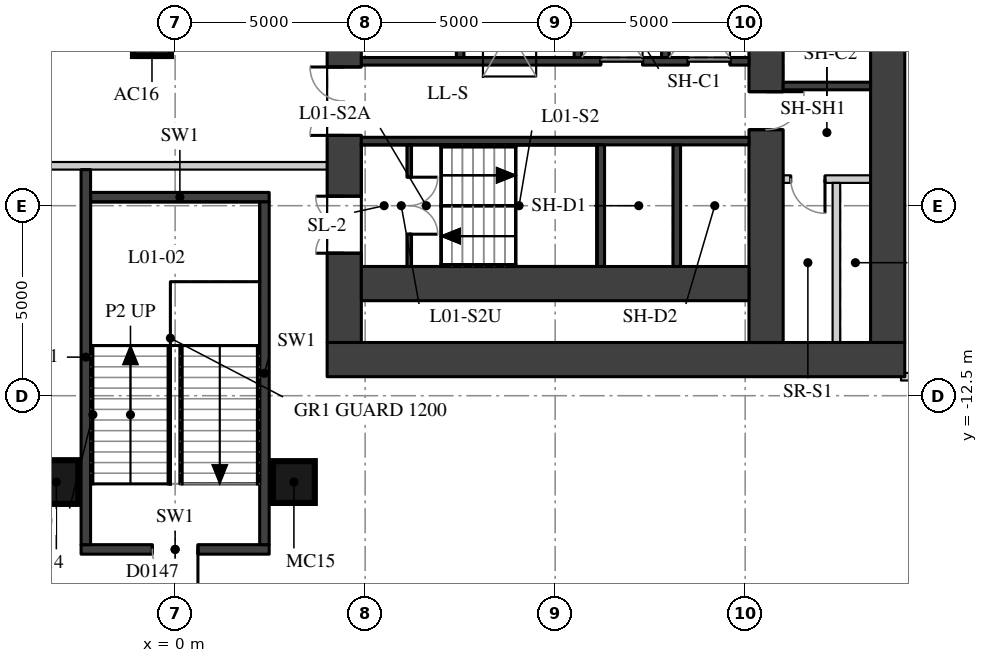
"""IFC4 building model, lengths in metres.
Left out: names, types, materials, properties, quantities, classifications, styles, units other than length and angle.
Written with IfcOpenShell. Run it as: python <this file> out.ifc"""

import sys

from ifc_helpers import new_model, si_unit, direction, frame, frame_2d, origin, origin_2d, place, context, subcontext, project, spatial, rectangle, extrude, element, fill, save


model = new_model("IFC4")
c1 = context("Model", 3, precision=1e-05, world=origin(), true_north=direction((0.0, 1.0)))
c2 = subcontext(c1, "Body", "Model", "MODEL_VIEW")
j1 = project(units=[si_unit("LENGTHUNIT", "METRE"), si_unit("PLANEANGLEUNIT", "RADIAN")], contexts=[c1])
p1 = place(None, origin())
s1 = spatial("IfcSite", under=j1, at=p1, CompositionType="ELEMENT")
p2 = place(p1, origin())
s2 = spatial("IfcBuilding", under=s1, at=p2, CompositionType="ELEMENT")
p3 = place(p2, frame((0.0, 0.0, 7.5)))
s3 = spatial("IfcBuildingStorey", under=s2, at=p3, CompositionType="ELEMENT", Elevation=7.5)
p4 = place(p3, frame((-0.609, -3.062, 0.0), z_axis=(0.0, 0.0, 1.0), x_axis=(1.0, 0.0, 0.0)))
e1 = element("IfcColumn", 1, at=p4, inside=s3, PredefinedType="COLUMN", context=c2, shape_type="SweptSolid", body=[
    extrude(rectangle(XDim=1.0, YDim=1.0, at=origin_2d()), origin(), (0.0, 0.0, 1.0), 5.0),
])
p5 = place(p3, frame((-3.126, -14.772, 0.0), z_axis=(0.0, 0.0, 1.0), x_axis=(1.0, 0.0, 0.0)))
e2 = element("IfcColumn", 2, at=p5, inside=s3, PredefinedType="COLUMN", context=c2, shape_type="SweptSolid", body=[
    extrude(rectangle(XDim=1.15, YDim=1.15, at=origin_2d()), origin(), (0.0, 0.0, 1.0), 5.0),
])
p6 = place(p3, frame((3.126, -14.772, 0.0), z_axis=(0.0, 0.0, 1.0), x_axis=(1.0, 0.0, 0.0)))
e3 = element("IfcColumn", 3, at=p6, inside=s3, PredefinedType="COLUMN", context=c2, shape_type="SweptSolid", body=[
    extrude(rectangle(XDim=1.1, YDim=1.1, at=origin_2d()), origin(), (0.0, 0.0, 1.0), 5.0),
])
p7 = place(p3, frame((4.45, -11.1, 0.0), z_axis=(0.0, 0.0, 1.0), x_axis=(0.0, 1.0, 0.0)))
e4 = element("IfcWall", 4, at=p7, inside=s3, PredefinedType="SHEAR", context=c2, shape_type="SweptSolid", body=[
    extrude(rectangle(XDim=22.2, YDim=0.9, at=frame_2d((11.1, 0.0))), origin(), (0.0, 0.0, 1.0), 4.59),
])
p8 = place(p7, frame((2.35, 0.0, 0.0)))
e5 = element("IfcOpeningElement", 5, at=p8, cuts=e4, PredefinedType="OPENING", context=c2, shape_type="SweptSolid", body=[
    extrude(rectangle(XDim=1.5, YDim=2.1, at=frame_2d((0.75, 1.05))), frame((0.0, 0.46, 0.0), z_axis=(0.0, -1.0, 0.0), x_axis=(1.0, 0.0, 0.0)), (0.0, 0.0, 1.0), 0.92),
])
p9 = place(p7, frame((5.45, 0.0, 0.0)))
e6 = element("IfcOpeningElement", 6, at=p9, cuts=e4, PredefinedType="OPENING", context=c2, shape_type="SweptSolid", body=[
    extrude(rectangle(XDim=1.8, YDim=2.1, at=frame_2d((0.9, 1.05))), frame((0.0, 0.46, 0.0), z_axis=(0.0, -1.0, 0.0), x_axis=(1.0, 0.0, 0.0)), (0.0, 0.0, 1.0), 0.92),
])
p10 = place(p7, frame((7.95, 0.0, 0.0)))
e7 = element("IfcOpeningElement", 7, at=p10, cuts=e4, PredefinedType="OPENING", context=c2, shape_type="SweptSolid", body=[
    extrude(rectangle(XDim=1.1, YDim=2.1, at=frame_2d((0.55, 1.05))), frame((0.0, 0.46, 0.0), z_axis=(0.0, -1.0, 0.0), x_axis=(1.0, 0.0, 0.0)), (0.0, 0.0, 1.0), 0.92),
])
p11 = place(p7, frame((10.6, 0.0, 0.0)))
e8 = element("IfcOpeningElement", 8, at=p11, cuts=e4, PredefinedType="OPENING", context=c2, shape_type="SweptSolid", body=[
    extrude(rectangle(XDim=1.0, YDim=2.1, at=frame_2d((0.5, 1.05))), frame((0.0, 0.46, 0.0), z_axis=(0.0, -1.0, 0.0), x_axis=(1.0, 0.0, 0.0)), (0.0, 0.0, 1.0), 0.92),
])
p12 = place(p7, frame((13.15, 0.0, 0.0)))
e9 = element("IfcOpeningElement", 9, at=p12, cuts=e4, PredefinedType="OPENING", context=c2, shape_type="SweptSolid", body=[
    extrude(rectangle(XDim=1.1, YDim=2.1, at=frame_2d((0.55, 1.05))), frame((0.0, 0.46, 0.0), z_axis=(0.0, -1.0, 0.0), x_axis=(1.0, 0.0, 0.0)), (0.0, 0.0, 1.0), 0.92),
])
p13 = place(p7, frame((14.95, 0.0, 0.0)))
e10 = element("IfcOpeningElement", 10, at=p13, cuts=e4, PredefinedType="OPENING", context=c2, shape_type="SweptSolid", body=[
    extrude(rectangle(XDim=1.8, YDim=2.1, at=frame_2d((0.9, 1.05))), frame((0.0, 0.46, 0.0), z_axis=(0.0, -1.0, 0.0), x_axis=(1.0, 0.0, 0.0)), (0.0, 0.0, 1.0), 0.92),
])
p14 = place(p7, frame((18.35, 0.0, 0.0)))
e11 = element("IfcOpeningElement", 11, at=p14, cuts=e4, PredefinedType="OPENING", context=c2, shape_type="SweptSolid", body=[
    extrude(rectangle(XDim=1.5, YDim=2.1, at=frame_2d((0.75, 1.05))), frame((0.0, 0.46, 0.0), z_axis=(0.0, -1.0, 0.0), x_axis=(1.0, 0.0, 0.0)), (0.0, 0.0, 1.0), 0.92),
])
p15 = place(p3, frame((18.75, -11.1, 0.0), z_axis=(0.0, 0.0, 1.0), x_axis=(0.0, 1.0, 0.0)))
e12 = element("IfcWall", 12, at=p15, inside=s3, PredefinedType="SHEAR", context=c2, shape_type="SweptSolid", body=[
    extrude(rectangle(XDim=22.2, YDim=0.9, at=frame_2d((11.1, 0.0))), origin(), (0.0, 0.0, 1.0), 4.59),
])
p16 = place(p3, frame((4.0, -11.55, 0.0), z_axis=(0.0, 0.0, 1.0), x_axis=(1.0, 0.0, 0.0)))
e13 = element("IfcWall", 13, at=p16, inside=s3, PredefinedType="SHEAR", context=c2, shape_type="SweptSolid", body=[
    extrude(rectangle(XDim=15.2, YDim=0.9, at=frame_2d((7.6, 0.0))), origin(), (0.0, 0.0, 1.0), 4.59),
])
p17 = place(p3, frame((15.55, -11.1, 0.0), z_axis=(0.0, 0.0, 1.0), x_axis=(0.0, 1.0, 0.0)))
e14 = element("IfcWall", 14, at=p17, inside=s3, PredefinedType="SHEAR", context=c2, shape_type="SweptSolid", body=[
    extrude(rectangle(XDim=22.2, YDim=0.9, at=frame_2d((11.1, 0.0))), origin(), (0.0, 0.0, 1.0), 4.59),
])
p18 = place(p17, frame((15.6, 0.0, 0.0)))
e15 = element("IfcOpeningElement", 15, at=p18, cuts=e14, PredefinedType="OPENING", context=c2, shape_type="SweptSolid", body=[
    extrude(rectangle(XDim=1.0, YDim=2.1, at=frame_2d((0.5, 1.05))), frame((0.0, 0.46, 0.0), z_axis=(0.0, -1.0, 0.0), x_axis=(1.0, 0.0, 0.0)), (0.0, 0.0, 1.0), 0.92),
])
p19 = place(p17, frame((5.6, 0.0, 0.0)))
e16 = element("IfcOpeningElement", 16, at=p19, cuts=e14, PredefinedType="OPENING", context=c2, shape_type="SweptSolid", body=[
    extrude(rectangle(XDim=1.0, YDim=2.1, at=frame_2d((0.5, 1.05))), frame((0.0, 0.46, 0.0), z_axis=(0.0, -1.0, 0.0), x_axis=(1.0, 0.0, 0.0)), (0.0, 0.0, 1.0), 0.92),
])
p20 = place(p3, frame((4.9, -9.55, 0.0), z_axis=(0.0, 0.0, 1.0), x_axis=(1.0, 0.0, 0.0)))
e17 = element("IfcWall", 17, at=p20, inside=s3, PredefinedType="SHEAR", context=c2, shape_type="SweptSolid", body=[
    extrude(rectangle(XDim=10.2, YDim=0.9, at=frame_2d((5.1, 0.0))), origin(), (0.0, 0.0, 1.0), 4.59),
])
p21 = place(p3, frame((4.9, -3.7, 0.0), z_axis=(0.0, 0.0, 1.0), x_axis=(1.0, 0.0, 0.0)))
e18 = element("IfcWall", 18, at=p21, inside=s3, PredefinedType="SHEAR", context=c2, shape_type="SweptSolid", body=[
    extrude(rectangle(XDim=10.2, YDim=0.2, at=frame_2d((5.1, 0.0))), origin(), (0.0, 0.0, 1.0), 4.59),
])
p22 = place(p21, frame((6.3, 0.0, 0.0)))
e19 = element("IfcOpeningElement", 19, at=p22, cuts=e18, PredefinedType="OPENING", context=c2, shape_type="SweptSolid", body=[
    extrude(rectangle(XDim=1.1, YDim=2.1, at=frame_2d((0.55, 1.05))), frame((0.0, 0.11, 0.0), z_axis=(0.0, -1.0, 0.0), x_axis=(1.0, 0.0, 0.0)), (0.0, 0.0, 1.0), 0.22),
])
p23 = place(p21, frame((8.6, 0.0, 0.0)))
e20 = element("IfcOpeningElement", 20, at=p23, cuts=e18, PredefinedType="OPENING", context=c2, shape_type="SweptSolid", body=[
    extrude(rectangle(XDim=1.1, YDim=2.1, at=frame_2d((0.55, 1.05))), frame((0.0, 0.11, 0.0), z_axis=(0.0, -1.0, 0.0), x_axis=(1.0, 0.0, 0.0)), (0.0, 0.0, 1.0), 0.22),
])
p24 = place(p3, frame((4.9, -5.8, 0.0), z_axis=(0.0, 0.0, 1.0), x_axis=(1.0, 0.0, 0.0)))
e21 = element("IfcWall", 21, at=p24, inside=s3, PredefinedType="SHEAR", context=c2, shape_type="SweptSolid", body=[
    extrude(rectangle(XDim=10.2, YDim=0.2, at=frame_2d((5.1, 0.0))), origin(), (0.0, 0.0, 1.0), 4.59),
])
for number, where, z_axis, x_axis in (
    (22, (11.2, -9.1, 0.0), (0.0, 0.0, 1.0), (0.0, 1.0, 0.0)),
    (23, (13.2, -9.1, 0.0), (0.0, 0.0, 1.0), (0.0, 1.0, 0.0)),
):
    element("IfcWall", number, at=place(p3, frame(where, z_axis=z_axis, x_axis=x_axis)), inside=s3, PredefinedType="SHEAR", context=c2, shape_type="SweptSolid", body=[
        extrude(rectangle(XDim=3.2, YDim=0.2, at=frame_2d((1.6, 0.0))), origin(), (0.0, 0.0, 1.0), 4.59),
    ])
p25 = place(p3, frame((7.5, -3.6, 0.0), z_axis=(0.0, 0.0, 1.0), x_axis=(0.0, 1.0, 0.0)))
e24 = element("IfcWall", 24, at=p25, inside=s3, PredefinedType="SHEAR", context=c2, shape_type="SweptSolid", body=[
    extrude(rectangle(XDim=2.5, YDim=0.2, at=frame_2d((1.25, 0.0))), origin(), (0.0, 0.0, 1.0), 4.59),
])
p26 = place(p25, frame((0.7, 0.0, 0.0)))
e25 = element("IfcOpeningElement", 25, at=p26, cuts=e24, PredefinedType="OPENING", context=c2, shape_type="SweptSolid", body=[
    extrude(rectangle(XDim=1.1, YDim=2.1, at=frame_2d((0.55, 1.05))), frame((0.0, 0.11, 0.0), z_axis=(0.0, -1.0, 0.0), x_axis=(1.0, 0.0, 0.0)), (0.0, 0.0, 1.0), 0.22),
])
for number, where, z_axis, x_axis in (
    (26, (10.6, -3.6, 0.0), (0.0, 0.0, 1.0), (0.0, 1.0, 0.0)),
    (27, (12.9, -3.6, 0.0), (0.0, 0.0, 1.0), (0.0, 1.0, 0.0)),
):
    element("IfcWall", number, at=place(p3, frame(where, z_axis=z_axis, x_axis=x_axis)), inside=s3, PredefinedType="SHEAR", context=c2, shape_type="SweptSolid", body=[
        extrude(rectangle(XDim=2.5, YDim=0.2, at=frame_2d((1.25, 0.0))), origin(), (0.0, 0.0, 1.0), 4.59),
    ])
p27 = place(p3, frame((6.16, -9.1, 0.0), z_axis=(0.0, 0.0, 1.0), x_axis=(0.0, 1.0, 0.0)))
e28 = element("IfcWall", 28, at=p27, inside=s3, PredefinedType="SHEAR", context=c2, shape_type="SweptSolid", body=[
    extrude(rectangle(XDim=3.2, YDim=0.12, at=frame_2d((1.6, 0.0))), origin(), (0.0, 0.0, 1.0), 2.29),
])
p28 = place(p27, frame((0.85, 0.0, 0.0)))
e29 = element("IfcOpeningElement", 29, at=p28, cuts=e28, PredefinedType="OPENING", context=c2, shape_type="SweptSolid", body=[
    extrude(rectangle(XDim=1.5, YDim=2.1, at=frame_2d((0.75, 1.05))), frame((0.0, 0.07, 0.0), z_axis=(0.0, -1.0, 0.0), x_axis=(1.0, 0.0, 0.0)), (0.0, 0.0, 1.0), 0.14),
])
p29 = place(p3, frame((16.0, -4.35, 0.0), z_axis=(0.0, 0.0, 1.0), x_axis=(1.0, 0.0, 0.0)))
e30 = element("IfcWall", 30, at=p29, inside=s3, PredefinedType="SHEAR", context=c2, shape_type="SweptSolid", body=[
    extrude(rectangle(XDim=2.3, YDim=0.2, at=frame_2d((1.15, 0.0))), origin(), (0.0, 0.0, 1.0), 4.59),
])
p30 = place(p3, frame((16.0, -6.8, 0.0), z_axis=(0.0, 0.0, 1.0), x_axis=(1.0, 0.0, 0.0)))
e31 = element("IfcWall", 31, at=p30, inside=s3, PredefinedType="PARTITIONING", context=c2, shape_type="SweptSolid", body=[
    extrude(rectangle(XDim=2.3, YDim=0.2, at=frame_2d((1.15, 0.0))), origin(), (0.0, 0.0, 1.0), 4.59),
])
p31 = place(p30, frame((0.2, 0.0, 0.0)))
e32 = element("IfcOpeningElement", 32, at=p31, cuts=e31, PredefinedType="OPENING", context=c2, shape_type="SweptSolid", body=[
    extrude(rectangle(XDim=0.9, YDim=2.1, at=frame_2d((0.45, 1.05))), frame((0.0, 0.11, 0.0), z_axis=(0.0, -1.0, 0.0), x_axis=(1.0, 0.0, 0.0)), (0.0, 0.0, 1.0), 0.22),
])
p32 = place(p3, frame((17.4, -11.1, 0.0), z_axis=(0.0, 0.0, 1.0), x_axis=(0.0, 1.0, 0.0)))
e33 = element("IfcWall", 33, at=p32, inside=s3, PredefinedType="PARTITIONING", context=c2, shape_type="SweptSolid", body=[
    extrude(rectangle(XDim=4.2, YDim=0.2, at=frame_2d((2.1, 0.0))), origin(), (0.0, 0.0, 1.0), 4.59),
])
p33 = place(p3, frame((-2.475, -16.545, 0.0), z_axis=(0.0, 0.0, 1.0), x_axis=(1.0, 0.0, 0.0)))
e34 = element("IfcWall", 34, at=p33, inside=s3, PredefinedType="SOLIDWALL", context=c2, shape_type="SweptSolid", body=[
    extrude(rectangle(XDim=4.95, YDim=0.25, at=frame_2d((2.475, 0.0))), origin(), (0.0, 0.0, 1.0), 4.59),
])
p34 = place(p33, frame((1.875, 0.0, 0.0)))
e35 = element("IfcOpeningElement", 35, at=p34, cuts=e34, PredefinedType="OPENING", context=c2, shape_type="SweptSolid", body=[
    extrude(rectangle(XDim=1.2, YDim=2.1, at=frame_2d((0.6, 1.05))), frame((0.0, 0.135, 0.0), z_axis=(0.0, -1.0, 0.0), x_axis=(1.0, 0.0, 0.0)), (0.0, 0.0, 1.0), 0.27),
])
p35 = place(p3, frame((19.1, -12.0, 0.0), z_axis=(0.0, 0.0, 1.0), x_axis=(1.0, 0.0, 0.0)))
e36 = element("IfcWall", 36, at=p35, inside=s3, PredefinedType="PARTITIONING", context=c2, shape_type="SweptSolid", body=[
    extrude(rectangle(XDim=21.767, YDim=0.2, at=frame_2d((10.883, 0.0))), origin(), (0.0, 0.0, 1.0), 3.69),
])
p36 = place(p35, frame((4.4, 0.0, 0.0)))
e37 = element("IfcOpeningElement", 37, at=p36, cuts=e36, PredefinedType="OPENING", context=c2, shape_type="SweptSolid", body=[
    extrude(rectangle(XDim=1.0, YDim=2.1, at=frame_2d((0.5, 1.05))), frame((0.0, 0.11, 0.0), z_axis=(0.0, -1.0, 0.0), x_axis=(1.0, 0.0, 0.0)), (0.0, 0.0, 1.0), 0.22),
])
p37 = place(p3, frame((-2.225, -7.275, 0.0), z_axis=(0.0, 0.0, 1.0), x_axis=(1.0, 0.0, 0.0)))
e38 = element("IfcWall", 38, at=p37, inside=s3, PredefinedType="SOLIDWALL", context=c2, shape_type="SweptSolid", body=[
    extrude(rectangle(XDim=4.7, YDim=0.25, at=frame_2d((2.35, 0.0))), origin(), (0.0, 0.0, 1.0), 4.59),
])
p38 = place(p3, frame((-14.4, -6.45, 0.0), z_axis=(0.0, 0.0, 1.0), x_axis=(1.0, 0.0, 0.0)))
e39 = element("IfcWall", 39, at=p38, inside=s3, PredefinedType="PARTITIONING", context=c2, shape_type="SweptSolid", body=[
    extrude(rectangle(XDim=18.402, YDim=0.2, at=frame_2d((9.201, 0.0))), origin(), (0.0, 0.0, 1.0), 4.59),
])
p39 = place(p38, frame((8.001, 0.0, 0.0)))
e40 = element("IfcOpeningElement", 40, at=p39, cuts=e39, PredefinedType="OPENING", context=c2, shape_type="SweptSolid", body=[
    extrude(rectangle(XDim=2.4, YDim=2.4, at=frame_2d((1.2, 1.2))), frame((0.0, 0.11, 0.0), z_axis=(0.0, -1.0, 0.0), x_axis=(1.0, 0.0, 0.0)), (0.0, 0.0, 1.0), 0.22),
])
p40 = place(p3, frame((-2.35, -16.42, 0.0), z_axis=(0.0, 0.0, 1.0), x_axis=(0.0, 1.0, 0.0)))
e41 = element("IfcWall", 41, at=p40, inside=s3, PredefinedType="SOLIDWALL", context=c2, shape_type="SweptSolid", body=[
    extrude(rectangle(XDim=9.87, YDim=0.25, at=frame_2d((4.935, 0.0))), origin(), (0.0, 0.0, 1.0), 4.59),
])
p41 = place(p3, frame((2.35, -16.42, 0.0), z_axis=(0.0, 0.0, 1.0), x_axis=(0.0, 1.0, 0.0)))
e42 = element("IfcWall", 42, at=p41, inside=s3, PredefinedType="SOLIDWALL", context=c2, shape_type="SweptSolid", body=[
    extrude(rectangle(XDim=9.02, YDim=0.25, at=frame_2d((4.51, 0.0))), origin(), (0.0, 0.0, 1.0), 4.59),
])
p42 = place(p8, origin())
e43 = element("IfcDoor", 43, at=p42, inside=s3, OperationType="DOUBLE_DOOR_SINGLE_SWING", PredefinedType="DOOR", context=c2, shape_type="SweptSolid", body=[
    extrude(rectangle(XDim=1.5, YDim=2.1, at=frame_2d((0.75, 1.05))), frame((0.0, 0.025, 0.0), z_axis=(0.0, -1.0, 0.0), x_axis=(1.0, 0.0, 0.0)), (0.0, 0.0, 1.0), 0.05),
])
fill(e5, e43)
p43 = place(p9, origin())
e44 = element("IfcDoor", 44, at=p43, inside=s3, OperationType="DOUBLE_DOOR_SINGLE_SWING", PredefinedType="DOOR", context=c2, shape_type="SweptSolid", body=[
    extrude(rectangle(XDim=1.8, YDim=2.1, at=frame_2d((0.9, 1.05))), frame((0.0, 0.025, 0.0), z_axis=(0.0, -1.0, 0.0), x_axis=(1.0, 0.0, 0.0)), (0.0, 0.0, 1.0), 0.05),
])
fill(e6, e44)
p44 = place(p28, origin())
e45 = element("IfcDoor", 45, at=p44, inside=s3, OperationType="DOUBLE_DOOR_SINGLE_SWING", PredefinedType="DOOR", context=c2, shape_type="SweptSolid", body=[
    extrude(rectangle(XDim=1.5, YDim=2.1, at=frame_2d((0.75, 1.05))), frame((0.0, 0.025, 0.0), z_axis=(0.0, -1.0, 0.0), x_axis=(1.0, 0.0, 0.0)), (0.0, 0.0, 1.0), 0.05),
])
fill(e29, e45)
p45 = place(p22, origin())
e46 = element("IfcDoor", 46, at=p45, inside=s3, OperationType="DOUBLE_DOOR_SLIDING", PredefinedType="DOOR", context=c2, shape_type="SweptSolid", body=[
    extrude(rectangle(XDim=1.1, YDim=2.1, at=frame_2d((0.55, 1.05))), frame((0.0, 0.025, 0.0), z_axis=(0.0, -1.0, 0.0), x_axis=(1.0, 0.0, 0.0)), (0.0, 0.0, 1.0), 0.05),
])
fill(e19, e46)
p46 = place(p23, origin())
e47 = element("IfcDoor", 47, at=p46, inside=s3, OperationType="DOUBLE_DOOR_SLIDING", PredefinedType="DOOR", context=c2, shape_type="SweptSolid", body=[
    extrude(rectangle(XDim=1.1, YDim=2.1, at=frame_2d((0.55, 1.05))), frame((0.0, 0.025, 0.0), z_axis=(0.0, -1.0, 0.0), x_axis=(1.0, 0.0, 0.0)), (0.0, 0.0, 1.0), 0.05),
])
fill(e20, e47)
p47 = place(p19, origin())
e48 = element("IfcDoor", 48, at=p47, inside=s3, OperationType="SINGLE_SWING_LEFT", PredefinedType="DOOR", context=c2, shape_type="SweptSolid", body=[
    extrude(rectangle(XDim=1.0, YDim=2.1, at=frame_2d((0.5, 1.05))), frame((0.0, 0.025, 0.0), z_axis=(0.0, -1.0, 0.0), x_axis=(1.0, 0.0, 0.0)), (0.0, 0.0, 1.0), 0.05),
])
fill(e16, e48)
p48 = place(p31, origin())
e49 = element("IfcDoor", 49, at=p48, inside=s3, OperationType="SINGLE_SWING_LEFT", PredefinedType="DOOR", context=c2, shape_type="SweptSolid", body=[
    extrude(rectangle(XDim=0.9, YDim=2.1, at=frame_2d((0.45, 1.05))), frame((0.0, 0.025, 0.0), z_axis=(0.0, -1.0, 0.0), x_axis=(1.0, 0.0, 0.0)), (0.0, 0.0, 1.0), 0.05),
])
fill(e32, e49)
p49 = place(p34, origin())
e50 = element("IfcDoor", 50, at=p49, inside=s3, OperationType="SINGLE_SWING_LEFT", PredefinedType="DOOR", context=c2, shape_type="SweptSolid", body=[
    extrude(rectangle(XDim=1.2, YDim=2.1, at=frame_2d((0.6, 1.05))), frame((0.0, 0.025, 0.0), z_axis=(0.0, -1.0, 0.0), x_axis=(1.0, 0.0, 0.0)), (0.0, 0.0, 1.0), 0.05),
])
fill(e35, e50)
save(model, sys.argv[1])
